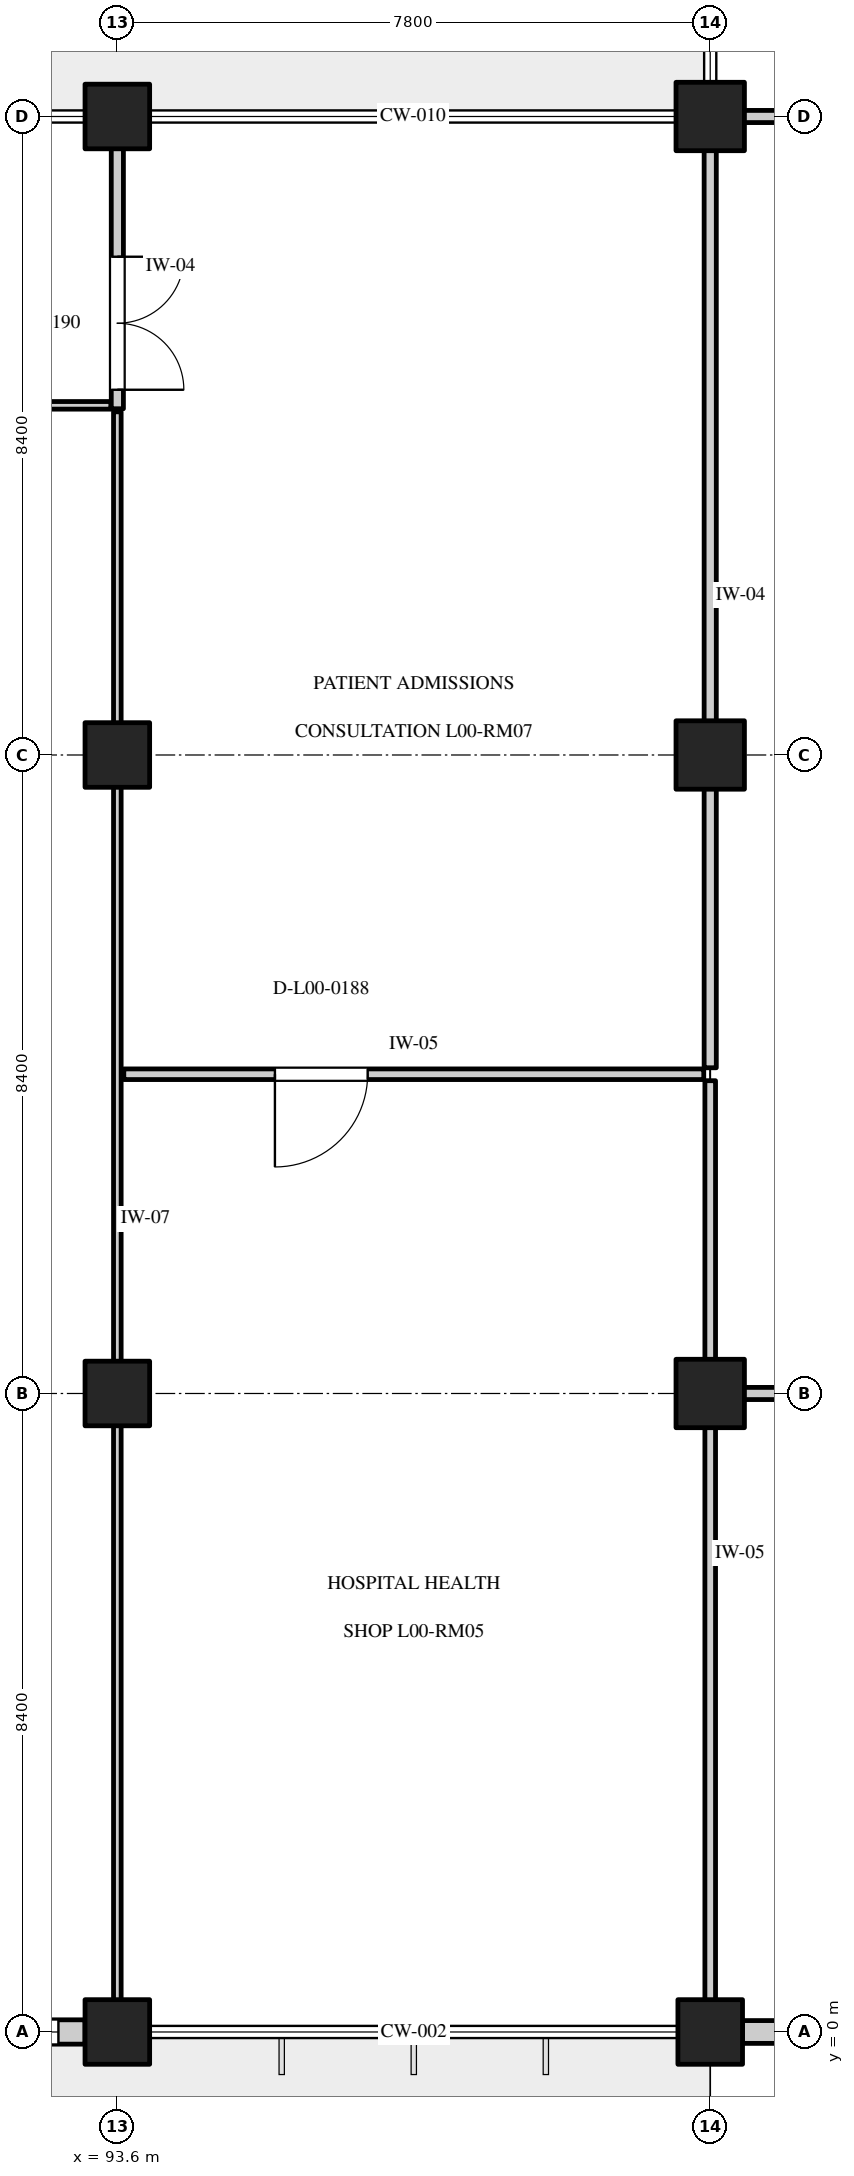
"""IFC4 building model, lengths in metres.
Left out: names, types, materials, properties, quantities, classifications, styles, units other than length and angle.
Written with IfcOpenShell. Run it as: python <this file> out.ifc"""

import sys

from ifc_helpers import new_model, si_unit, direction, frame, frame_2d, origin, origin_2d, place, context, subcontext, project, spatial, rectangle, circle, extrude, element, fill, save


model = new_model("IFC4")
c1 = context("Model", 3, precision=1e-05, world=origin(), true_north=direction((0.0, 1.0)))
c2 = subcontext(c1, "Body", "Model", "MODEL_VIEW")
j1 = project(units=[si_unit("LENGTHUNIT", "METRE"), si_unit("PLANEANGLEUNIT", "RADIAN")], contexts=[c1])
p1 = place(None, origin())
s1 = spatial("IfcSite", under=j1, at=p1, CompositionType="ELEMENT")
p2 = place(p1, origin())
s2 = spatial("IfcBuilding", under=s1, at=p2, CompositionType="ELEMENT")
p3 = place(p2, origin())
s3 = spatial("IfcBuildingStorey", under=s2, at=p3, CompositionType="ELEMENT", Elevation=0.0)
p4 = place(p3, frame((93.6, 0.0, 0.0), z_axis=(0.0, 0.0, 1.0), x_axis=(1.0, 0.0, 0.0)))
e1 = element("IfcColumn", 1, at=p4, inside=s3, PredefinedType="COLUMN", context=c2, shape_type="SweptSolid", body=[
    extrude(circle(Radius=0.425, at=origin_2d()), origin(), (0.0, 0.0, 1.0), 4.8),
])
for number, where, z_axis, x_axis in (
    (2, (93.6, 8.4, 0.0), (0.0, 0.0, 1.0), (1.0, 0.0, 0.0)),
    (3, (93.6, 16.8, 0.0), (0.0, 0.0, 1.0), (1.0, 0.0, 0.0)),
    (4, (93.6, 25.2, 0.0), (0.0, 0.0, 1.0), (1.0, 0.0, 0.0)),
):
    element("IfcColumn", number, at=place(p3, frame(where, z_axis=z_axis, x_axis=x_axis)), inside=s3, PredefinedType="COLUMN", context=c2, shape_type="SweptSolid", body=[
        extrude(rectangle(XDim=0.85, YDim=0.85, at=origin_2d()), origin(), (0.0, 0.0, 1.0), 4.8),
    ])
p5 = place(p3, frame((101.4, 0.0, 0.0), z_axis=(0.0, 0.0, 1.0), x_axis=(1.0, 0.0, 0.0)))
e5 = element("IfcColumn", 5, at=p5, inside=s3, PredefinedType="COLUMN", context=c2, shape_type="SweptSolid", body=[
    extrude(circle(Radius=0.425, at=origin_2d()), origin(), (0.0, 0.0, 1.0), 4.8),
])
for number, where, z_axis, x_axis in (
    (6, (101.4, 8.4, 0.0), (0.0, 0.0, 1.0), (1.0, 0.0, 0.0)),
    (7, (101.4, 16.8, 0.0), (0.0, 0.0, 1.0), (1.0, 0.0, 0.0)),
    (8, (101.4, 25.2, 0.0), (0.0, 0.0, 1.0), (1.0, 0.0, 0.0)),
):
    element("IfcColumn", number, at=place(p3, frame(where, z_axis=z_axis, x_axis=x_axis)), inside=s3, PredefinedType="COLUMN", context=c2, shape_type="SweptSolid", body=[
        extrude(rectangle(XDim=0.9, YDim=0.9, at=origin_2d()), origin(), (0.0, 0.0, 1.0), 4.8),
    ])
p6 = place(p3, frame((86.225, 0.0, 0.0), z_axis=(0.0, 0.0, 1.0), x_axis=(1.0, 0.0, 0.0)))
e9 = element("IfcWall", 9, at=p6, inside=s3, PredefinedType="STANDARD", context=c2, shape_type="SweptSolid", body=[
    extrude(rectangle(XDim=6.95, YDim=0.32, at=frame_2d((3.475, 0.0))), origin(), (0.0, 0.0, 1.0), 3.75),
])
p7 = place(p6, frame((2.525, 0.0, 0.0)))
e10 = element("IfcOpeningElement", 10, at=p7, cuts=e9, PredefinedType="OPENING", context=c2, shape_type="SweptSolid", body=[
    extrude(rectangle(XDim=1.9, YDim=2.25, at=frame_2d((0.95, 1.125))), frame((0.0, 0.172, 0.0), z_axis=(0.0, -1.0, 0.0), x_axis=(1.0, 0.0, 0.0)), (0.0, 0.0, 1.0), 0.344),
])
p8 = place(p6, frame((0.35, 0.0, 0.2)))
e11 = element("IfcOpeningElement", 11, at=p8, cuts=e9, PredefinedType="OPENING", context=c2, shape_type="SweptSolid", body=[
    extrude(rectangle(XDim=1.5, YDim=2.75, at=frame_2d((0.75, 1.375))), frame((0.0, 0.172, 0.0), z_axis=(0.0, -1.0, 0.0), x_axis=(1.0, 0.0, 0.0)), (0.0, 0.0, 1.0), 0.344),
])
p9 = place(p6, frame((5.1, 0.0, 0.2)))
e12 = element("IfcOpeningElement", 12, at=p9, cuts=e9, PredefinedType="OPENING", context=c2, shape_type="SweptSolid", body=[
    extrude(rectangle(XDim=1.5, YDim=2.75, at=frame_2d((0.75, 1.375))), frame((0.0, 0.172, 0.0), z_axis=(0.0, -1.0, 0.0), x_axis=(1.0, 0.0, 0.0)), (0.0, 0.0, 1.0), 0.344),
])
p10 = place(p3, frame((101.825, 0.0, 0.0), z_axis=(0.0, 0.0, 1.0), x_axis=(1.0, 0.0, 0.0)))
e13 = element("IfcWall", 13, at=p10, inside=s3, PredefinedType="STANDARD", context=c2, shape_type="SweptSolid", body=[
    extrude(rectangle(XDim=6.925, YDim=0.3, at=frame_2d((3.462, 0.0))), origin(), (0.0, 0.0, 1.0), 3.75),
])
p11 = place(p10, frame((0.535, 0.0, 0.75)))
e14 = element("IfcOpeningElement", 14, at=p11, cuts=e13, PredefinedType="OPENING", context=c2, shape_type="SweptSolid", body=[
    extrude(rectangle(XDim=1.2, YDim=1.55, at=frame_2d((0.6, 0.775))), frame((0.0, 0.162, 0.0), z_axis=(0.0, -1.0, 0.0), x_axis=(1.0, 0.0, 0.0)), (0.0, 0.0, 1.0), 0.324),
])
p12 = place(p10, frame((2.875, 0.0, 0.75)))
e15 = element("IfcOpeningElement", 15, at=p12, cuts=e13, PredefinedType="OPENING", context=c2, shape_type="SweptSolid", body=[
    extrude(rectangle(XDim=1.2, YDim=1.55, at=frame_2d((0.6, 0.775))), frame((0.0, 0.162, 0.0), z_axis=(0.0, -1.0, 0.0), x_axis=(1.0, 0.0, 0.0)), (0.0, 0.0, 1.0), 0.324),
])
p13 = place(p10, frame((5.215, 0.0, 0.75)))
e16 = element("IfcOpeningElement", 16, at=p13, cuts=e13, PredefinedType="OPENING", context=c2, shape_type="SweptSolid", body=[
    extrude(rectangle(XDim=1.2, YDim=1.55, at=frame_2d((0.6, 0.775))), frame((0.0, 0.162, 0.0), z_axis=(0.0, -1.0, 0.0), x_axis=(1.0, 0.0, 0.0)), (0.0, 0.0, 1.0), 0.324),
])
p14 = place(p3, frame((62.485, 21.4, 0.0), z_axis=(0.0, 0.0, 1.0), x_axis=(1.0, 0.0, 0.0)))
e17 = element("IfcWall", 17, at=p14, inside=s3, PredefinedType="PARTITIONING", context=c2, shape_type="SweptSolid", body=[
    extrude(rectangle(XDim=31.03, YDim=0.1, at=frame_2d((15.515, 0.0))), origin(), (0.0, 0.0, 1.0), 4.43),
])
p15 = place(p14, frame((1.98, 0.0, 0.0)))
e18 = element("IfcOpeningElement", 18, at=p15, cuts=e17, PredefinedType="OPENING", context=c2, shape_type="SweptSolid", body=[
    extrude(rectangle(XDim=1.12, YDim=2.2, at=frame_2d((0.56, 1.1))), frame((0.0, 0.062, 0.0), z_axis=(0.0, -1.0, 0.0), x_axis=(1.0, 0.0, 0.0)), (0.0, 0.0, 1.0), 0.124),
])
p16 = place(p3, frame((93.6, 0.085, 0.0), z_axis=(0.0, 0.0, 1.0), x_axis=(0.0, 1.0, 0.0)))
e19 = element("IfcWall", 19, at=p16, inside=s3, PredefinedType="PARTITIONING", context=c2, shape_type="SweptSolid", body=[
    extrude(rectangle(XDim=21.23, YDim=0.1, at=frame_2d((10.615, 0.0))), origin(), (0.0, 0.0, 1.0), 4.43),
])
p17 = place(p3, frame((93.685, 12.6, 0.0), z_axis=(0.0, 0.0, 1.0), x_axis=(1.0, 0.0, 0.0)))
e20 = element("IfcWall", 20, at=p17, inside=s3, PredefinedType="PARTITIONING", context=c2, shape_type="SweptSolid", body=[
    extrude(rectangle(XDim=7.63, YDim=0.14, at=frame_2d((3.815, 0.0))), origin(), (0.0, 0.0, 1.0), 4.43),
])
p18 = place(p17, frame((1.988, 0.0, 0.0)))
e21 = element("IfcOpeningElement", 21, at=p18, cuts=e20, PredefinedType="OPENING", context=c2, shape_type="SweptSolid", body=[
    extrude(rectangle(XDim=1.22, YDim=2.15, at=frame_2d((0.61, 1.075))), frame((0.0, 0.082, 0.0), z_axis=(0.0, -1.0, 0.0), x_axis=(1.0, 0.0, 0.0)), (0.0, 0.0, 1.0), 0.164),
])
p19 = place(p3, frame((101.4, 0.085, 0.0), z_axis=(0.0, 0.0, 1.0), x_axis=(0.0, 1.0, 0.0)))
e22 = element("IfcWall", 22, at=p19, inside=s3, PredefinedType="PARTITIONING", context=c2, shape_type="SweptSolid", body=[
    extrude(rectangle(XDim=12.43, YDim=0.14, at=frame_2d((6.215, 0.0))), origin(), (0.0, 0.0, 1.0), 3.7),
])
p20 = place(p3, frame((93.6, 21.355, 0.0), z_axis=(0.0, 0.0, 1.0), x_axis=(0.0, 1.0, 0.0)))
e23 = element("IfcWall", 23, at=p20, inside=s3, PredefinedType="PARTITIONING", context=c2, shape_type="SweptSolid", body=[
    extrude(rectangle(XDim=3.76, YDim=0.16, at=frame_2d((1.88, 0.0))), origin(), (0.0, 0.0, 1.0), 4.43),
])
p21 = place(p20, frame((0.25, 0.0, 0.0)))
e24 = element("IfcOpeningElement", 24, at=p21, cuts=e23, PredefinedType="OPENING", context=c2, shape_type="SweptSolid", body=[
    extrude(rectangle(XDim=1.75, YDim=2.3, at=frame_2d((0.875, 1.15))), frame((0.0, 0.092, 0.0), z_axis=(0.0, -1.0, 0.0), x_axis=(1.0, 0.0, 0.0)), (0.0, 0.0, 1.0), 0.184),
])
p22 = place(p3, frame((101.4, 12.685, 0.0), z_axis=(0.0, 0.0, 1.0), x_axis=(0.0, 1.0, 0.0)))
e25 = element("IfcWall", 25, at=p22, inside=s3, PredefinedType="PARTITIONING", context=c2, shape_type="SweptSolid", body=[
    extrude(rectangle(XDim=12.43, YDim=0.16, at=frame_2d((6.215, 0.0))), origin(), (0.0, 0.0, 1.0), 3.7),
])
p23 = place(p3, frame((101.485, 8.4, 0.0), z_axis=(0.0, 0.0, 1.0), x_axis=(1.0, 0.0, 0.0)))
e26 = element("IfcWall", 26, at=p23, inside=s3, PredefinedType="PARTITIONING", context=c2, shape_type="SweptSolid", body=[
    extrude(rectangle(XDim=15.43, YDim=0.16, at=frame_2d((7.715, 0.0))), origin(), (0.0, 0.0, 1.0), 4.43),
])
p24 = place(p23, frame((2.301, 0.0, 0.0)))
e27 = element("IfcOpeningElement", 27, at=p24, cuts=e26, PredefinedType="OPENING", context=c2, shape_type="SweptSolid", body=[
    extrude(rectangle(XDim=1.6, YDim=2.25, at=frame_2d((0.8, 1.125))), frame((0.0, 0.092, 0.0), z_axis=(0.0, -1.0, 0.0), x_axis=(1.0, 0.0, 0.0)), (0.0, 0.0, 1.0), 0.184),
])
p25 = place(p3, frame((101.485, 25.2, 0.0), z_axis=(0.0, 0.0, 1.0), x_axis=(1.0, 0.0, 0.0)))
e28 = element("IfcWall", 28, at=p25, inside=s3, PredefinedType="PARTITIONING", context=c2, shape_type="SweptSolid", body=[
    extrude(rectangle(XDim=15.43, YDim=0.16, at=frame_2d((7.715, 0.0))), origin(), (0.0, 0.0, 1.0), 3.7),
])
p26 = place(p25, frame((1.958, 0.0, 0.0)))
e29 = element("IfcOpeningElement", 29, at=p26, cuts=e28, PredefinedType="OPENING", context=c2, shape_type="SweptSolid", body=[
    extrude(rectangle(XDim=1.95, YDim=2.35, at=frame_2d((0.975, 1.175))), frame((0.0, 0.092, 0.0), z_axis=(0.0, -1.0, 0.0), x_axis=(1.0, 0.0, 0.0)), (0.0, 0.0, 1.0), 0.184),
])
p27 = place(p9, origin())
e30 = element("IfcWindow", 30, at=p27, inside=s3, PartitioningType="SINGLE_PANEL", PredefinedType="WINDOW", context=c2, shape_type="SweptSolid", body=[
    extrude(rectangle(XDim=1.5, YDim=2.75, at=frame_2d((0.75, 1.375))), frame((0.0, 0.03, 0.0), z_axis=(0.0, -1.0, 0.0), x_axis=(1.0, 0.0, 0.0)), (0.0, 0.0, 1.0), 0.06),
])
fill(e12, e30)
p28 = place(p18, frame((1.22, 0.0, 0.0), z_axis=(0.0, 0.0, 1.0), x_axis=(-1.0, 0.0, 0.0)))
e31 = element("IfcDoor", 31, at=p28, inside=s3, OperationType="SINGLE_SWING_RIGHT", PredefinedType="DOOR", context=c2, shape_type="SweptSolid", body=[
    extrude(rectangle(XDim=1.22, YDim=2.15, at=frame_2d((0.61, 1.075))), frame((0.0, 0.025, 0.0), z_axis=(0.0, -1.0, 0.0), x_axis=(1.0, 0.0, 0.0)), (0.0, 0.0, 1.0), 0.05),
])
fill(e21, e31)
p29 = place(p21, frame((1.75, 0.0, 0.0), z_axis=(0.0, 0.0, 1.0), x_axis=(-1.0, 0.0, 0.0)))
e32 = element("IfcDoor", 32, at=p29, inside=s3, OperationType="DOUBLE_DOOR_SINGLE_SWING", PredefinedType="DOOR", context=c2, shape_type="SweptSolid", body=[
    extrude(rectangle(XDim=1.75, YDim=2.3, at=frame_2d((0.875, 1.15))), frame((0.0, 0.025, 0.0), z_axis=(0.0, -1.0, 0.0), x_axis=(1.0, 0.0, 0.0)), (0.0, 0.0, 1.0), 0.05),
])
fill(e24, e32)
save(model, sys.argv[1])
